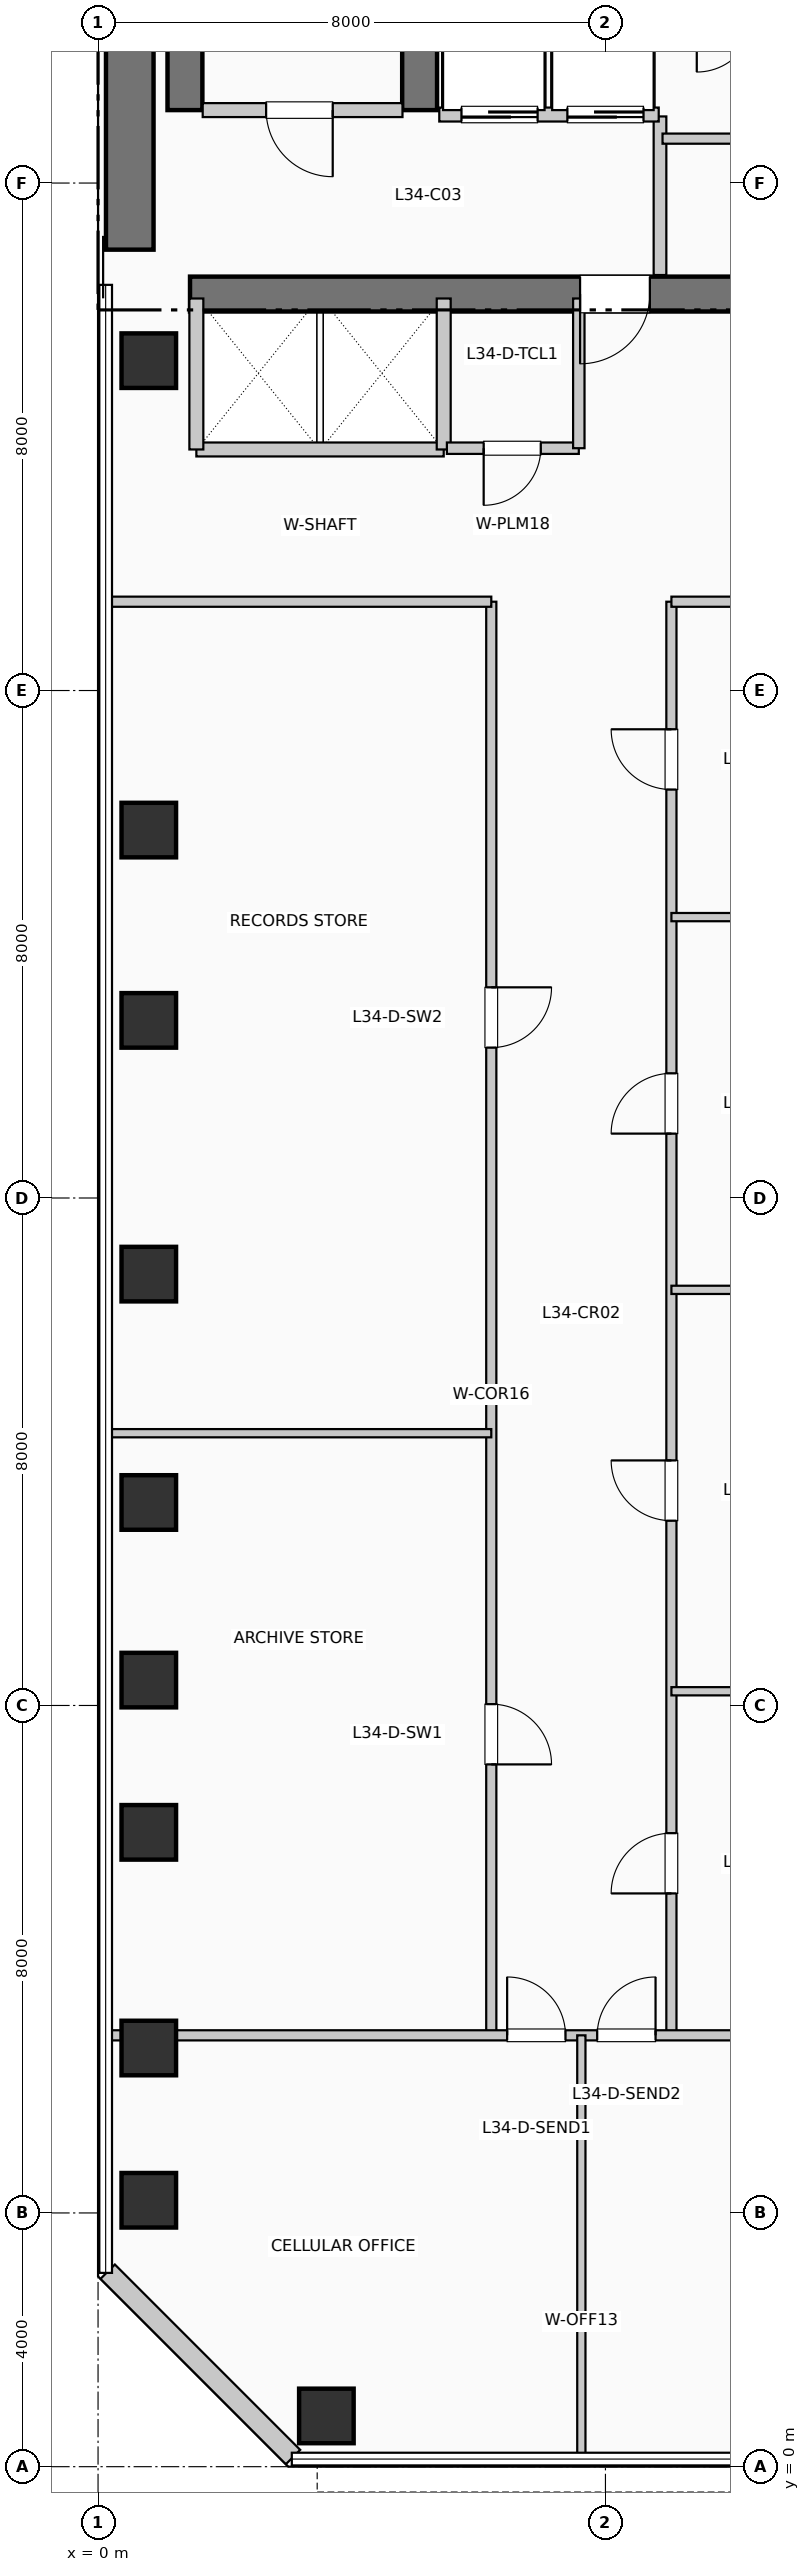
"""IFC4 building model, lengths in metres.
Left out: names, types, materials, properties, quantities, classifications, styles, units other than length and angle.
Written with IfcOpenShell. Run it as: python <this file> out.ifc"""

import sys

from ifc_helpers import new_model, si_unit, direction, frame, frame_2d, origin, origin_2d, place, context, subcontext, project, spatial, rectangle, extrude, element, fill, save


model = new_model("IFC4")
c1 = context("Model", 3, precision=1e-05, world=origin(), true_north=direction((0.0, 1.0)))
c2 = subcontext(c1, "Body", "Model", "MODEL_VIEW")
j1 = project(units=[si_unit("LENGTHUNIT", "METRE"), si_unit("PLANEANGLEUNIT", "RADIAN")], contexts=[c1])
p1 = place(None, origin())
s1 = spatial("IfcSite", under=j1, at=p1, CompositionType="ELEMENT")
p2 = place(p1, origin())
s2 = spatial("IfcBuilding", under=s1, at=p2, CompositionType="ELEMENT")
p3 = place(p2, frame((0.0, 0.0, 142.89)))
s3 = spatial("IfcBuildingStorey", under=s2, at=p3, CompositionType="ELEMENT", Elevation=142.89)
p4 = place(p3, frame((0.5, 34.95, 0.0), z_axis=(0.0, 0.0, 1.0), x_axis=(0.0, 1.0, 0.0)))
e1 = element("IfcWall", 1, at=p4, inside=s3, PredefinedType="SHEAR", context=c2, shape_type="SweptSolid", body=[
    extrude(rectangle(XDim=7.9, YDim=0.75, at=frame_2d((3.95, 0.0))), origin(), (0.0, 0.0, 1.0), 3.96),
])
p5 = place(p3, frame((1.45, 34.25, 0.0), z_axis=(0.0, 0.0, 1.0), x_axis=(1.0, 0.0, 0.0)))
e2 = element("IfcWall", 2, at=p5, inside=s3, PredefinedType="SHEAR", context=c2, shape_type="SweptSolid", body=[
    extrude(rectangle(XDim=10.71, YDim=0.55, at=frame_2d((5.355, 0.0))), origin(), (0.0, 0.0, 1.0), 3.96),
])
p6 = place(p5, frame((7.25, 0.0, 0.0), z_axis=(0.0, 0.0, 1.0), x_axis=(-1.0, 0.0, 0.0)))
e3 = element("IfcOpeningElement", 3, at=p6, cuts=e2, PredefinedType="OPENING", context=c2, shape_type="SweptSolid", body=[
    extrude(rectangle(XDim=1.1, YDim=2.15, at=frame_2d((0.55, 1.075))), frame((0.0, 0.285, 0.0), z_axis=(0.0, -1.0, 0.0), x_axis=(1.0, 0.0, 0.0)), (0.0, 0.0, 1.0), 0.57),
])
for number, where, z_axis, x_axis in (
    (4, (1.37, 37.15, 0.0), (0.0, 0.0, 1.0), (0.0, 1.0, 0.0)),
    (5, (5.07, 37.15, 0.0), (0.0, 0.0, 1.0), (0.0, 1.0, 0.0)),
):
    element("IfcWall", number, at=place(p3, frame(where, z_axis=z_axis, x_axis=x_axis)), inside=s3, PredefinedType="SHEAR", context=c2, shape_type="SweptSolid", body=[
        extrude(rectangle(XDim=7.89, YDim=0.55, at=frame_2d((3.945, 0.0))), origin(), (0.0, 0.0, 1.0), 3.96),
    ])
for number, where, z_axis, x_axis in (
    (6, (0.8, 4.2, 0.0), (0.0, 0.0, 1.0), (1.0, 0.0, 0.0)),
    (7, (0.8, 6.6, 0.0), (0.0, 0.0, 1.0), (1.0, 0.0, 0.0)),
    (8, (0.8, 10.0, 0.0), (0.0, 0.0, 1.0), (1.0, 0.0, 0.0)),
    (9, (0.8, 12.4, 0.0), (0.0, 0.0, 1.0), (1.0, 0.0, 0.0)),
    (10, (0.8, 15.2, 0.0), (0.0, 0.0, 1.0), (1.0, 0.0, 0.0)),
    (11, (0.8, 18.8, 0.0), (0.0, 0.0, 1.0), (1.0, 0.0, 0.0)),
    (12, (0.8, 22.8, 0.0), (0.0, 0.0, 1.0), (1.0, 0.0, 0.0)),
    (13, (0.8, 25.8, 0.0), (0.0, 0.0, 1.0), (1.0, 0.0, 0.0)),
    (14, (0.8, 33.2, 0.0), (0.0, 0.0, 1.0), (1.0, 0.0, 0.0)),
    (15, (3.6, 0.8, 0.0), (0.0, 0.0, 1.0), (1.0, 0.0, 0.0)),
):
    element("IfcColumn", number, at=place(p3, frame(where, z_axis=z_axis, x_axis=x_axis)), inside=s3, PredefinedType="COLUMN", context=c2, shape_type="SweptSolid", body=[
        extrude(rectangle(XDim=0.86, YDim=0.86, at=origin_2d()), origin(), (0.0, 0.0, 1.0), 3.96),
    ])
p7 = place(p3, frame((0.152, 3.074, 0.0), z_axis=(0.0, 0.0, 1.0), x_axis=(0.707106781187, -0.707106781187, 0.0)))
e16 = element("IfcWall", 16, at=p7, inside=s3, PredefinedType="SOLIDWALL", context=c2, shape_type="SweptSolid", body=[
    extrude(rectangle(XDim=4.133, YDim=0.32, at=frame_2d((2.066, 0.0))), origin(), (0.0, 0.0, 1.0), 3.71),
])
p8 = place(p3, frame((1.65, 37.15, 0.0), z_axis=(0.0, 0.0, 1.0), x_axis=(1.0, 0.0, 0.0)))
e17 = element("IfcWall", 17, at=p8, inside=s3, PredefinedType="PARTITIONING", context=c2, shape_type="SweptSolid", body=[
    extrude(rectangle(XDim=3.15, YDim=0.22, at=frame_2d((1.575, 0.0))), origin(), (0.0, 0.0, 1.0), 3.71),
])
p9 = place(p8, frame((2.05, 0.0, 0.0), z_axis=(0.0, 0.0, 1.0), x_axis=(-1.0, 0.0, 0.0)))
e18 = element("IfcOpeningElement", 18, at=p9, cuts=e17, PredefinedType="OPENING", context=c2, shape_type="SweptSolid", body=[
    extrude(rectangle(XDim=1.05, YDim=2.15, at=frame_2d((0.525, 1.075))), frame((0.0, 0.12, 0.0), z_axis=(0.0, -1.0, 0.0), x_axis=(1.0, 0.0, 0.0)), (0.0, 0.0, 1.0), 0.24),
])
p10 = place(p3, frame((8.86, 34.55, 0.0), z_axis=(0.0, 0.0, 1.0), x_axis=(0.0, 1.0, 0.0)))
e19 = element("IfcWall", 19, at=p10, inside=s3, PredefinedType="PARTITIONING", context=c2, shape_type="SweptSolid", body=[
    extrude(rectangle(XDim=2.5, YDim=0.2, at=frame_2d((1.25, 0.0))), origin(), (0.0, 0.0, 1.0), 3.71),
])
p11 = place(p3, frame((5.38, 37.08, 0.0), z_axis=(0.0, 0.0, 1.0), x_axis=(1.0, 0.0, 0.0)))
e20 = element("IfcWall", 20, at=p11, inside=s3, PredefinedType="PARTITIONING", context=c2, shape_type="SweptSolid", body=[
    extrude(rectangle(XDim=3.46, YDim=0.22, at=frame_2d((1.73, 0.0))), origin(), (0.0, 0.0, 1.0), 3.71),
])
p12 = place(p11, frame((1.55, 0.0, 0.0), z_axis=(0.0, 0.0, 1.0), x_axis=(-1.0, 0.0, 0.0)))
e21 = element("IfcOpeningElement", 21, at=p12, cuts=e20, PredefinedType="OPENING", context=c2, shape_type="SweptSolid", body=[
    extrude(rectangle(XDim=1.2, YDim=2.2, at=frame_2d((0.6, 1.1))), frame((0.0, 0.12, 0.0), z_axis=(0.0, -1.0, 0.0), x_axis=(1.0, 0.0, 0.0)), (0.0, 0.0, 1.0), 0.24),
])
p13 = place(p11, frame((3.22, 0.0, 0.0), z_axis=(0.0, 0.0, 1.0), x_axis=(-1.0, 0.0, 0.0)))
e22 = element("IfcOpeningElement", 22, at=p13, cuts=e20, PredefinedType="OPENING", context=c2, shape_type="SweptSolid", body=[
    extrude(rectangle(XDim=1.2, YDim=2.2, at=frame_2d((0.6, 1.1))), frame((0.0, 0.12, 0.0), z_axis=(0.0, -1.0, 0.0), x_axis=(1.0, 0.0, 0.0)), (0.0, 0.0, 1.0), 0.24),
])
p14 = place(p3, frame((1.55, 31.8, 0.0), z_axis=(0.0, 0.0, 1.0), x_axis=(1.0, 0.0, 0.0)))
e23 = element("IfcWall", 23, at=p14, inside=s3, PredefinedType="PARTITIONING", context=c2, shape_type="SweptSolid", body=[
    extrude(rectangle(XDim=3.9, YDim=0.22, at=frame_2d((1.95, 0.0))), origin(), (0.0, 0.0, 1.0), 3.71),
])
for number, where, z_axis, x_axis in (
    (24, (1.55, 31.8, 0.0), (0.0, 0.0, 1.0), (0.0, 1.0, 0.0)),
    (25, (5.45, 31.8, 0.0), (0.0, 0.0, 1.0), (0.0, 1.0, 0.0)),
):
    element("IfcWall", number, at=place(p3, frame(where, z_axis=z_axis, x_axis=x_axis)), inside=s3, PredefinedType="PARTITIONING", context=c2, shape_type="SweptSolid", body=[
        extrude(rectangle(XDim=2.38, YDim=0.22, at=frame_2d((1.19, 0.0))), origin(), (0.0, 0.0, 1.0), 3.71),
    ])
p15 = place(p3, frame((5.5, 31.82, 0.0), z_axis=(0.0, 0.0, 1.0), x_axis=(1.0, 0.0, 0.0)))
e26 = element("IfcWall", 26, at=p15, inside=s3, PredefinedType="PLUMBINGWALL", context=c2, shape_type="SweptSolid", body=[
    extrude(rectangle(XDim=2.08, YDim=0.18, at=frame_2d((1.04, 0.0))), origin(), (0.0, 0.0, 1.0), 3.71),
])
p16 = place(p15, frame((1.48, 0.0, 0.0), z_axis=(0.0, 0.0, 1.0), x_axis=(-1.0, 0.0, 0.0)))
e27 = element("IfcOpeningElement", 27, at=p16, cuts=e26, PredefinedType="OPENING", context=c2, shape_type="SweptSolid", body=[
    extrude(rectangle(XDim=0.9, YDim=2.1, at=frame_2d((0.45, 1.05))), frame((0.0, 0.1, 0.0), z_axis=(0.0, -1.0, 0.0), x_axis=(1.0, 0.0, 0.0)), (0.0, 0.0, 1.0), 0.2),
])
p17 = place(p3, frame((7.58, 31.82, 0.0), z_axis=(0.0, 0.0, 1.0), x_axis=(0.0, 1.0, 0.0)))
e28 = element("IfcWall", 28, at=p17, inside=s3, PredefinedType="PLUMBINGWALL", context=c2, shape_type="SweptSolid", body=[
    extrude(rectangle(XDim=2.36, YDim=0.18, at=frame_2d((1.18, 0.0))), origin(), (0.0, 0.0, 1.0), 3.71),
])
p18 = place(p3, frame((8.9, 36.7, 0.0), z_axis=(0.0, 0.0, 1.0), x_axis=(1.0, 0.0, 0.0)))
e29 = element("IfcWall", 29, at=p18, inside=s3, PredefinedType="PARTITIONING", context=c2, shape_type="SweptSolid", body=[
    extrude(rectangle(XDim=3.25, YDim=0.16, at=frame_2d((1.625, 0.0))), origin(), (0.0, 0.0, 1.0), 3.71),
])
p19 = place(p18, frame((1.1, 0.0, 0.0)))
e30 = element("IfcOpeningElement", 30, at=p19, cuts=e29, PredefinedType="OPENING", context=c2, shape_type="SweptSolid", body=[
    extrude(rectangle(XDim=0.95, YDim=2.15, at=frame_2d((0.475, 1.075))), frame((0.0, 0.09, 0.0), z_axis=(0.0, -1.0, 0.0), x_axis=(1.0, 0.0, 0.0)), (0.0, 0.0, 1.0), 0.18),
])
p20 = place(p3, frame((6.2, 6.8, 0.0), z_axis=(0.0, 0.0, 1.0), x_axis=(0.0, 1.0, 0.0)))
e31 = element("IfcWall", 31, at=p20, inside=s3, PredefinedType="PARTITIONING", context=c2, shape_type="SweptSolid", body=[
    extrude(rectangle(XDim=22.6, YDim=0.16, at=frame_2d((11.3, 0.0))), origin(), (0.0, 0.0, 1.0), 3.71),
])
p21 = place(p20, frame((5.221, 0.0, 0.0), z_axis=(0.0, 0.0, 1.0), x_axis=(-1.0, 0.0, 0.0)))
e32 = element("IfcOpeningElement", 32, at=p21, cuts=e31, PredefinedType="OPENING", context=c2, shape_type="SweptSolid", body=[
    extrude(rectangle(XDim=0.95, YDim=2.15, at=frame_2d((0.475, 1.075))), frame((0.0, 0.09, 0.0), z_axis=(0.0, -1.0, 0.0), x_axis=(1.0, 0.0, 0.0)), (0.0, 0.0, 1.0), 0.18),
])
p22 = place(p20, frame((16.521, 0.0, 0.0), z_axis=(0.0, 0.0, 1.0), x_axis=(-1.0, 0.0, 0.0)))
e33 = element("IfcOpeningElement", 33, at=p22, cuts=e31, PredefinedType="OPENING", context=c2, shape_type="SweptSolid", body=[
    extrude(rectangle(XDim=0.95, YDim=2.15, at=frame_2d((0.475, 1.075))), frame((0.0, 0.09, 0.0), z_axis=(0.0, -1.0, 0.0), x_axis=(1.0, 0.0, 0.0)), (0.0, 0.0, 1.0), 0.18),
])
p23 = place(p3, frame((9.04, 6.8, 0.0), z_axis=(0.0, 0.0, 1.0), x_axis=(0.0, 1.0, 0.0)))
e34 = element("IfcWall", 34, at=p23, inside=s3, PredefinedType="PARTITIONING", context=c2, shape_type="SweptSolid", body=[
    extrude(rectangle(XDim=22.6, YDim=0.16, at=frame_2d((11.3, 0.0))), origin(), (0.0, 0.0, 1.0), 3.71),
])
p24 = place(p23, frame((2.237, 0.0, 0.0)))
e35 = element("IfcOpeningElement", 35, at=p24, cuts=e34, PredefinedType="OPENING", context=c2, shape_type="SweptSolid", body=[
    extrude(rectangle(XDim=0.95, YDim=2.15, at=frame_2d((0.475, 1.075))), frame((0.0, 0.09, 0.0), z_axis=(0.0, -1.0, 0.0), x_axis=(1.0, 0.0, 0.0)), (0.0, 0.0, 1.0), 0.18),
])
p25 = place(p23, frame((8.113, 0.0, 0.0)))
e36 = element("IfcOpeningElement", 36, at=p25, cuts=e34, PredefinedType="OPENING", context=c2, shape_type="SweptSolid", body=[
    extrude(rectangle(XDim=0.95, YDim=2.15, at=frame_2d((0.475, 1.075))), frame((0.0, 0.09, 0.0), z_axis=(0.0, -1.0, 0.0), x_axis=(1.0, 0.0, 0.0)), (0.0, 0.0, 1.0), 0.18),
])
p26 = place(p23, frame((14.215, 0.0, 0.0)))
e37 = element("IfcOpeningElement", 37, at=p26, cuts=e34, PredefinedType="OPENING", context=c2, shape_type="SweptSolid", body=[
    extrude(rectangle(XDim=0.95, YDim=2.15, at=frame_2d((0.475, 1.075))), frame((0.0, 0.09, 0.0), z_axis=(0.0, -1.0, 0.0), x_axis=(1.0, 0.0, 0.0)), (0.0, 0.0, 1.0), 0.18),
])
p27 = place(p23, frame((19.639, 0.0, 0.0)))
e38 = element("IfcOpeningElement", 38, at=p27, cuts=e34, PredefinedType="OPENING", context=c2, shape_type="SweptSolid", body=[
    extrude(rectangle(XDim=0.95, YDim=2.15, at=frame_2d((0.475, 1.075))), frame((0.0, 0.09, 0.0), z_axis=(0.0, -1.0, 0.0), x_axis=(1.0, 0.0, 0.0)), (0.0, 0.0, 1.0), 0.18),
])
p28 = place(p3, frame((0.19, 6.8, 0.0), z_axis=(0.0, 0.0, 1.0), x_axis=(1.0, 0.0, 0.0)))
e39 = element("IfcWall", 39, at=p28, inside=s3, PredefinedType="PARTITIONING", context=c2, shape_type="SweptSolid", body=[
    extrude(rectangle(XDim=23.26, YDim=0.16, at=frame_2d((11.63, 0.0))), origin(), (0.0, 0.0, 1.0), 3.045),
])
p29 = place(p28, frame((6.26, 0.0, 0.0)))
e40 = element("IfcOpeningElement", 40, at=p29, cuts=e39, PredefinedType="OPENING", context=c2, shape_type="SweptSolid", body=[
    extrude(rectangle(XDim=0.92, YDim=2.1, at=frame_2d((0.46, 1.05))), frame((0.0, 0.09, 0.0), z_axis=(0.0, -1.0, 0.0), x_axis=(1.0, 0.0, 0.0)), (0.0, 0.0, 1.0), 0.18),
])
p30 = place(p28, frame((7.68, 0.0, 0.0)))
e41 = element("IfcOpeningElement", 41, at=p30, cuts=e39, PredefinedType="OPENING", context=c2, shape_type="SweptSolid", body=[
    extrude(rectangle(XDim=0.92, YDim=2.1, at=frame_2d((0.46, 1.05))), frame((0.0, 0.09, 0.0), z_axis=(0.0, -1.0, 0.0), x_axis=(1.0, 0.0, 0.0)), (0.0, 0.0, 1.0), 0.18),
])
p31 = place(p3, frame((0.19, 29.4, 0.0), z_axis=(0.0, 0.0, 1.0), x_axis=(1.0, 0.0, 0.0)))
e42 = element("IfcWall", 42, at=p31, inside=s3, PredefinedType="PARTITIONING", context=c2, shape_type="SweptSolid", body=[
    extrude(rectangle(XDim=6.01, YDim=0.16, at=frame_2d((3.005, 0.0))), origin(), (0.0, 0.0, 1.0), 3.365),
])
p32 = place(p3, frame((9.04, 29.4, 0.0), z_axis=(0.0, 0.0, 1.0), x_axis=(1.0, 0.0, 0.0)))
e43 = element("IfcWall", 43, at=p32, inside=s3, PredefinedType="PARTITIONING", context=c2, shape_type="SweptSolid", body=[
    extrude(rectangle(XDim=14.41, YDim=0.16, at=frame_2d((7.205, 0.0))), origin(), (0.0, 0.0, 1.0), 3.365),
])
p33 = place(p3, frame((7.62, 0.19, 0.0), z_axis=(0.0, 0.0, 1.0), x_axis=(0.0, 1.0, 0.0)))
e44 = element("IfcWall", 44, at=p33, inside=s3, PredefinedType="PARTITIONING", context=c2, shape_type="SweptSolid", body=[
    extrude(rectangle(XDim=6.61, YDim=0.13, at=frame_2d((3.305, 0.0))), origin(), (0.0, 0.0, 1.0), 3.71),
])
p34 = place(p3, frame((0.19, 16.292, 0.0), z_axis=(0.0, 0.0, 1.0), x_axis=(1.0, 0.0, 0.0)))
e45 = element("IfcWall", 45, at=p34, inside=s3, PredefinedType="PARTITIONING", context=c2, shape_type="SweptSolid", body=[
    extrude(rectangle(XDim=6.01, YDim=0.13, at=frame_2d((3.005, 0.0))), origin(), (0.0, 0.0, 1.0), 3.71),
])
for number, where, z_axis, x_axis in (
    (46, (9.04, 12.224, 0.0), (0.0, 0.0, 1.0), (1.0, 0.0, 0.0)),
    (47, (9.04, 18.552, 0.0), (0.0, 0.0, 1.0), (1.0, 0.0, 0.0)),
):
    element("IfcWall", number, at=place(p3, frame(where, z_axis=z_axis, x_axis=x_axis)), inside=s3, PredefinedType="PARTITIONING", context=c2, shape_type="SweptSolid", body=[
        extrude(rectangle(XDim=14.41, YDim=0.13, at=frame_2d((7.205, 0.0))), origin(), (0.0, 0.0, 1.0), 3.045),
    ])
p35 = place(p3, frame((9.04, 24.428, 0.0), z_axis=(0.0, 0.0, 1.0), x_axis=(1.0, 0.0, 0.0)))
e48 = element("IfcWall", 48, at=p35, inside=s3, PredefinedType="PARTITIONING", context=c2, shape_type="SweptSolid", body=[
    extrude(rectangle(XDim=14.41, YDim=0.13, at=frame_2d((7.205, 0.0))), origin(), (0.0, 0.0, 1.0), 3.71),
])
p36 = place(p9, origin())
e49 = element("IfcDoor", 49, at=p36, inside=s3, OperationType="SINGLE_SWING_RIGHT", PredefinedType="DOOR", context=c2, shape_type="SweptSolid", body=[
    extrude(rectangle(XDim=1.05, YDim=2.15, at=frame_2d((0.525, 1.075))), frame((0.0, 0.025, 0.0), z_axis=(0.0, -1.0, 0.0), x_axis=(1.0, 0.0, 0.0)), (0.0, 0.0, 1.0), 0.05),
])
fill(e18, e49)
p37 = place(p6, origin())
e50 = element("IfcDoor", 50, at=p37, inside=s3, OperationType="SINGLE_SWING_LEFT", PredefinedType="DOOR", context=c2, shape_type="SweptSolid", body=[
    extrude(rectangle(XDim=1.1, YDim=2.15, at=frame_2d((0.55, 1.075))), frame((0.0, 0.025, 0.0), z_axis=(0.0, -1.0, 0.0), x_axis=(1.0, 0.0, 0.0)), (0.0, 0.0, 1.0), 0.05),
])
fill(e3, e50)
p38 = place(p12, origin())
e51 = element("IfcDoor", 51, at=p38, inside=s3, OperationType="SLIDING_TO_RIGHT", PredefinedType="DOOR", context=c2, shape_type="SweptSolid", body=[
    extrude(rectangle(XDim=1.2, YDim=2.2, at=frame_2d((0.6, 1.1))), frame((0.0, 0.025, 0.0), z_axis=(0.0, -1.0, 0.0), x_axis=(1.0, 0.0, 0.0)), (0.0, 0.0, 1.0), 0.05),
])
fill(e21, e51)
p39 = place(p13, origin())
e52 = element("IfcDoor", 52, at=p39, inside=s3, OperationType="SLIDING_TO_RIGHT", PredefinedType="DOOR", context=c2, shape_type="SweptSolid", body=[
    extrude(rectangle(XDim=1.2, YDim=2.2, at=frame_2d((0.6, 1.1))), frame((0.0, 0.025, 0.0), z_axis=(0.0, -1.0, 0.0), x_axis=(1.0, 0.0, 0.0)), (0.0, 0.0, 1.0), 0.05),
])
fill(e22, e52)
p40 = place(p16, origin())
e53 = element("IfcDoor", 53, at=p40, inside=s3, OperationType="SINGLE_SWING_LEFT", PredefinedType="DOOR", context=c2, shape_type="SweptSolid", body=[
    extrude(rectangle(XDim=0.9, YDim=2.1, at=frame_2d((0.45, 1.05))), frame((0.0, 0.025, 0.0), z_axis=(0.0, -1.0, 0.0), x_axis=(1.0, 0.0, 0.0)), (0.0, 0.0, 1.0), 0.05),
])
fill(e27, e53)
p41 = place(p29, origin())
e54 = element("IfcDoor", 54, at=p41, inside=s3, OperationType="SINGLE_SWING_LEFT", PredefinedType="DOOR", context=c2, shape_type="SweptSolid", body=[
    extrude(rectangle(XDim=0.92, YDim=2.1, at=frame_2d((0.46, 1.05))), frame((0.0, 0.025, 0.0), z_axis=(0.0, -1.0, 0.0), x_axis=(1.0, 0.0, 0.0)), (0.0, 0.0, 1.0), 0.05),
])
fill(e40, e54)
p42 = place(p30, origin())
e55 = element("IfcDoor", 55, at=p42, inside=s3, OperationType="SINGLE_SWING_RIGHT", PredefinedType="DOOR", context=c2, shape_type="SweptSolid", body=[
    extrude(rectangle(XDim=0.92, YDim=2.1, at=frame_2d((0.46, 1.05))), frame((0.0, 0.025, 0.0), z_axis=(0.0, -1.0, 0.0), x_axis=(1.0, 0.0, 0.0)), (0.0, 0.0, 1.0), 0.05),
])
fill(e41, e55)
p43 = place(p21, origin())
e56 = element("IfcDoor", 56, at=p43, inside=s3, OperationType="SINGLE_SWING_LEFT", PredefinedType="DOOR", context=c2, shape_type="SweptSolid", body=[
    extrude(rectangle(XDim=0.95, YDim=2.15, at=frame_2d((0.475, 1.075))), frame((0.0, 0.025, 0.0), z_axis=(0.0, -1.0, 0.0), x_axis=(1.0, 0.0, 0.0)), (0.0, 0.0, 1.0), 0.05),
])
fill(e32, e56)
p44 = place(p22, origin())
e57 = element("IfcDoor", 57, at=p44, inside=s3, OperationType="SINGLE_SWING_RIGHT", PredefinedType="DOOR", context=c2, shape_type="SweptSolid", body=[
    extrude(rectangle(XDim=0.95, YDim=2.15, at=frame_2d((0.475, 1.075))), frame((0.0, 0.025, 0.0), z_axis=(0.0, -1.0, 0.0), x_axis=(1.0, 0.0, 0.0)), (0.0, 0.0, 1.0), 0.05),
])
fill(e33, e57)
p45 = place(p24, origin())
e58 = element("IfcDoor", 58, at=p45, inside=s3, OperationType="SINGLE_SWING_LEFT", PredefinedType="DOOR", context=c2, shape_type="SweptSolid", body=[
    extrude(rectangle(XDim=0.95, YDim=2.15, at=frame_2d((0.475, 1.075))), frame((0.0, 0.025, 0.0), z_axis=(0.0, -1.0, 0.0), x_axis=(1.0, 0.0, 0.0)), (0.0, 0.0, 1.0), 0.05),
])
fill(e35, e58)
p46 = place(p25, origin())
e59 = element("IfcDoor", 59, at=p46, inside=s3, OperationType="SINGLE_SWING_RIGHT", PredefinedType="DOOR", context=c2, shape_type="SweptSolid", body=[
    extrude(rectangle(XDim=0.95, YDim=2.15, at=frame_2d((0.475, 1.075))), frame((0.0, 0.025, 0.0), z_axis=(0.0, -1.0, 0.0), x_axis=(1.0, 0.0, 0.0)), (0.0, 0.0, 1.0), 0.05),
])
fill(e36, e59)
p47 = place(p26, origin())
e60 = element("IfcDoor", 60, at=p47, inside=s3, OperationType="SINGLE_SWING_LEFT", PredefinedType="DOOR", context=c2, shape_type="SweptSolid", body=[
    extrude(rectangle(XDim=0.95, YDim=2.15, at=frame_2d((0.475, 1.075))), frame((0.0, 0.025, 0.0), z_axis=(0.0, -1.0, 0.0), x_axis=(1.0, 0.0, 0.0)), (0.0, 0.0, 1.0), 0.05),
])
fill(e37, e60)
p48 = place(p27, origin())
e61 = element("IfcDoor", 61, at=p48, inside=s3, OperationType="SINGLE_SWING_RIGHT", PredefinedType="DOOR", context=c2, shape_type="SweptSolid", body=[
    extrude(rectangle(XDim=0.95, YDim=2.15, at=frame_2d((0.475, 1.075))), frame((0.0, 0.025, 0.0), z_axis=(0.0, -1.0, 0.0), x_axis=(1.0, 0.0, 0.0)), (0.0, 0.0, 1.0), 0.05),
])
fill(e38, e61)
save(model, sys.argv[1])
